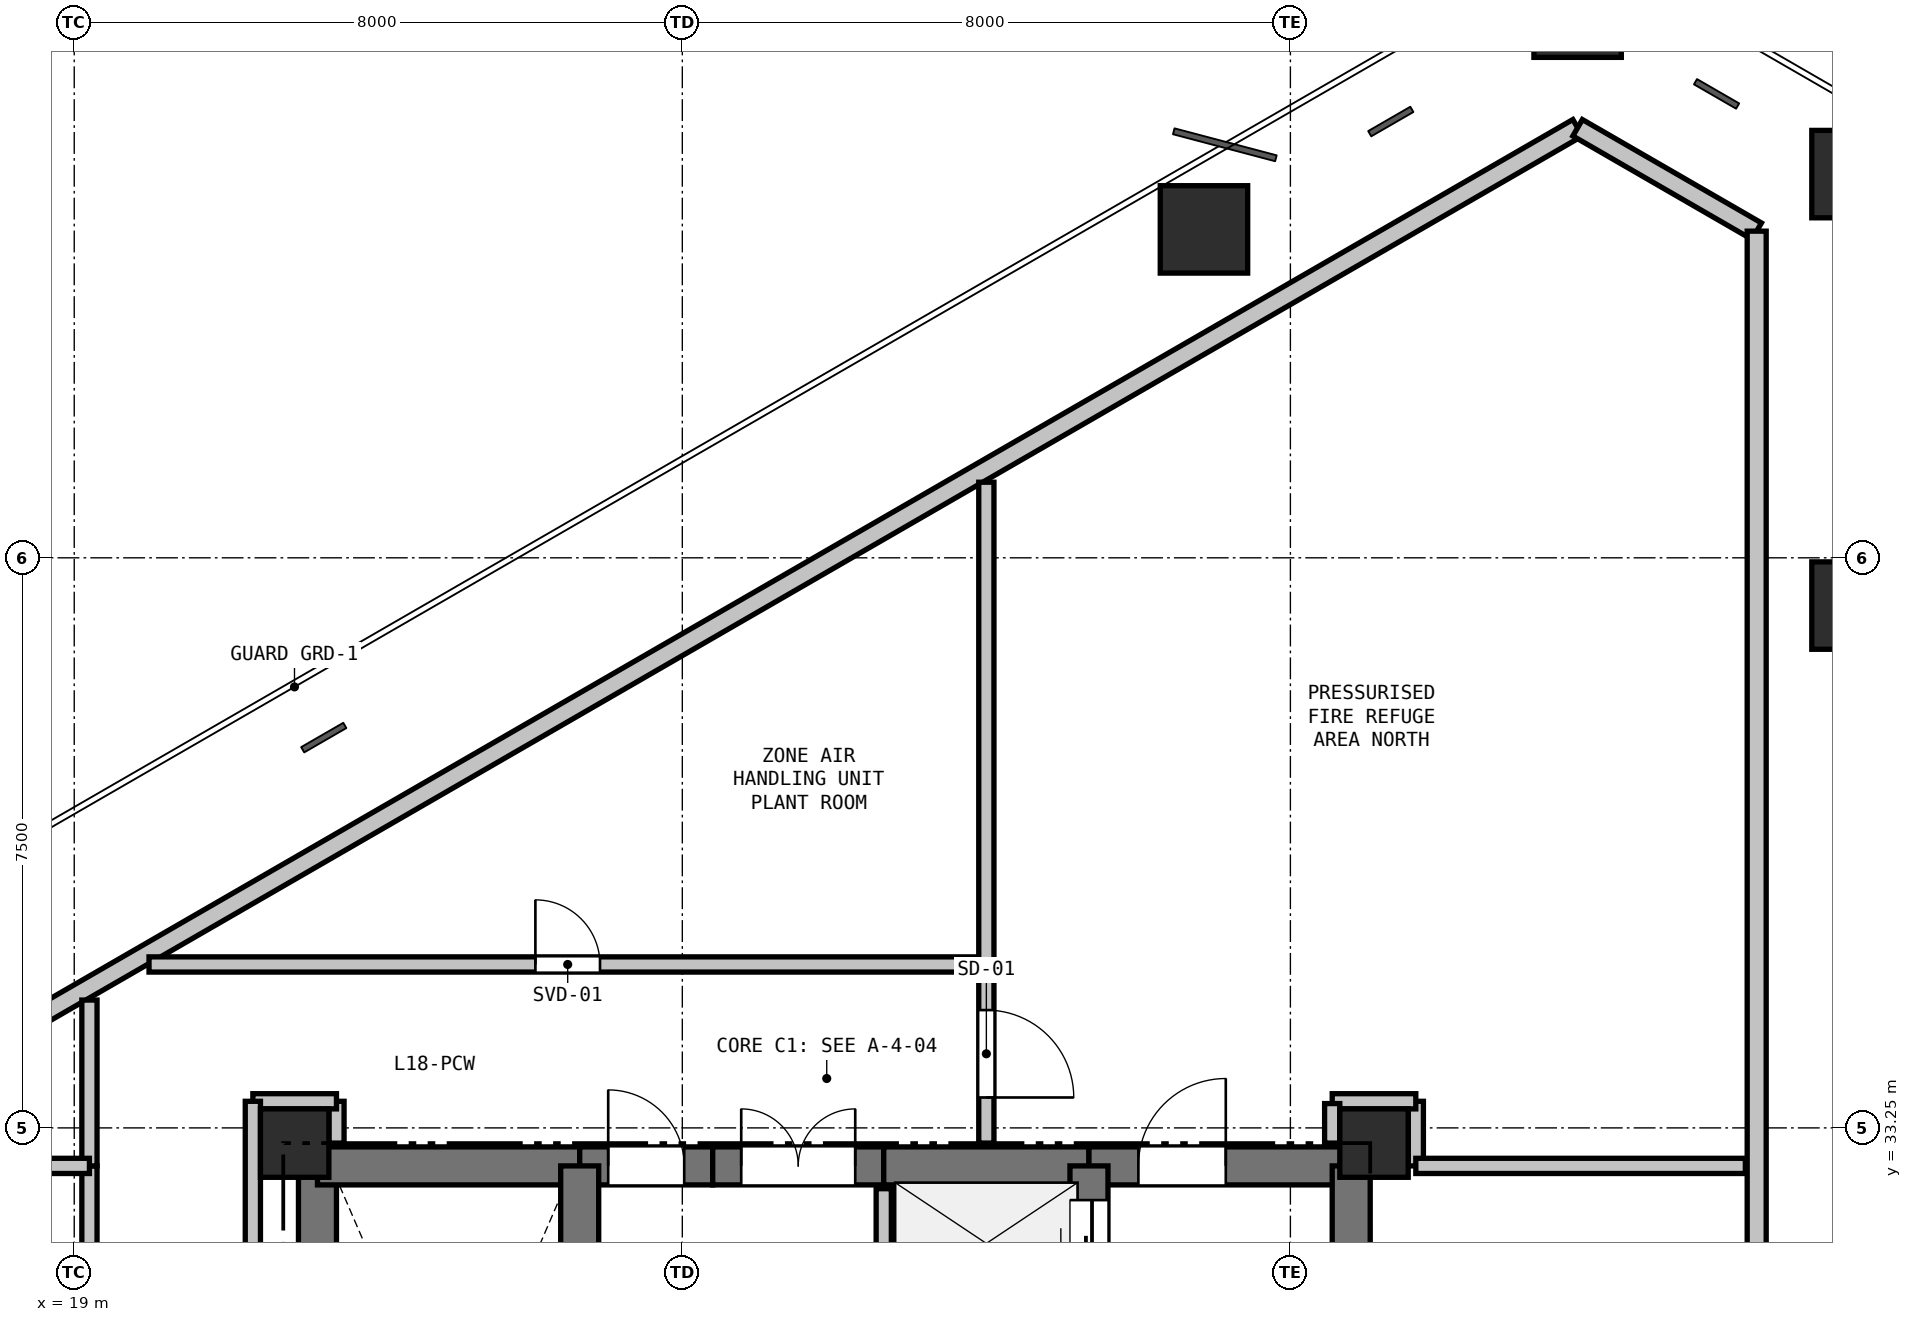
"""IFC4 building model, lengths in metres.
Left out: names, types, materials, properties, quantities, classifications, styles, units other than length and angle.
Written with IfcOpenShell. Run it as: python <this file> out.ifc"""

import sys

from ifc_helpers import new_model, si_unit, direction, frame, frame_2d, origin, origin_2d, place, context, subcontext, project, spatial, rectangle, hollow_rectangle, extrude, element, fill, save


model = new_model("IFC4")
c1 = context("Model", 3, precision=1e-05, world=origin(), true_north=direction((0.0, 1.0)))
c2 = subcontext(c1, "Body", "Model", "MODEL_VIEW")
j1 = project(units=[si_unit("LENGTHUNIT", "METRE"), si_unit("PLANEANGLEUNIT", "RADIAN")], contexts=[c1])
p1 = place(None, origin())
s1 = spatial("IfcSite", under=j1, at=p1, CompositionType="ELEMENT")
p2 = place(p1, origin())
s2 = spatial("IfcBuilding", under=s1, at=p2, CompositionType="ELEMENT")
p3 = place(p2, frame((0.0, 0.0, 66.9)))
s3 = spatial("IfcBuildingStorey", under=s2, at=p3, CompositionType="ELEMENT", Elevation=66.9)
for number, where, z_axis, x_axis in (
    (1, (21.9, 33.05, 0.0), (0.0, 0.0, 1.0), (1.0, 0.0, 0.0)),
    (2, (36.1, 33.05, 0.0), (0.0, 0.0, 1.0), (1.0, 0.0, 0.0)),
):
    element("IfcColumn", number, at=place(p3, frame(where, z_axis=z_axis, x_axis=x_axis)), inside=s3, PredefinedType="COLUMN", context=c2, shape_type="SweptSolid", body=[
        extrude(rectangle(XDim=0.9, YDim=0.9, at=origin_2d()), origin(), (0.0, 0.0, 1.0), 6.6),
    ])
for number, where, z_axis, x_axis in (
    (3, (33.863, 45.071, -0.32), (0.0, 0.0, 1.0), (1.0, 0.0, 0.0)),
    (4, (38.779, 47.909, -0.32), (0.0, 0.0, 1.0), (1.0, 0.0, 0.0)),
    (5, (42.435, 45.798, -0.32), (0.0, 0.0, 1.0), (1.0, 0.0, 0.0)),
    (6, (42.435, 40.122, -0.32), (0.0, 0.0, 1.0), (1.0, 0.0, 0.0)),
):
    element("IfcColumn", number, at=place(p3, frame(where, z_axis=z_axis, x_axis=x_axis)), inside=s3, PredefinedType="COLUMN", context=c2, shape_type="SweptSolid", body=[
        extrude(hollow_rectangle(XDim=1.15, YDim=1.15, WallThickness=0.032, at=origin_2d()), origin(), (0.0, 0.0, 1.0), 6.92),
    ])
p4 = place(p3, frame((7.087, 28.11, 0.0), z_axis=(0.0, 0.0, 1.0), x_axis=(0.866023716119, 0.500002923111, 0.0)))
e7 = element("IfcWall", 7, at=p4, inside=s3, PredefinedType="SOLIDWALL", context=c2, shape_type="SweptSolid", body=[
    extrude(rectangle(XDim=36.595, YDim=0.25, at=frame_2d((18.297, 0.0))), origin(), (0.0, 0.0, 1.0), 5.723),
])
p5 = place(p3, frame((38.779, 46.408, 0.0), z_axis=(0.0, 0.0, 1.0), x_axis=(0.865980815662, -0.500077220942, 0.0)))
e8 = element("IfcWall", 8, at=p5, inside=s3, PredefinedType="SOLIDWALL", context=c2, shape_type="SweptSolid", body=[
    extrude(rectangle(XDim=2.72, YDim=0.25, at=frame_2d((1.36, 0.0))), origin(), (0.0, 0.0, 1.0), 6.35),
])
p6 = place(p3, frame((41.135, 45.047, 0.0), z_axis=(0.0, 0.0, 1.0), x_axis=(0.0, -1.0, 0.0)))
e9 = element("IfcWall", 9, at=p6, inside=s3, PredefinedType="SOLIDWALL", context=c2, shape_type="SweptSolid", body=[
    extrude(rectangle(XDim=36.595, YDim=0.25, at=frame_2d((18.297, 0.0))), origin(), (0.0, 0.0, 1.0), 5.723),
])
p7 = place(p3, frame((22.2, 25.4, 0.0), z_axis=(0.0, 0.0, 1.0), x_axis=(0.0, 1.0, 0.0)))
e10 = element("IfcWall", 10, at=p7, inside=s3, PredefinedType="SHEAR", context=c2, shape_type="SweptSolid", body=[
    extrude(rectangle(XDim=7.35, YDim=0.5, at=frame_2d((3.675, 0.0))), origin(), (0.0, 0.0, 1.0), 6.35),
])
p8 = place(p3, frame((22.2, 32.75, 0.0), z_axis=(0.0, 0.0, 1.0), x_axis=(1.0, 0.0, 0.0)))
e11 = element("IfcWall", 11, at=p8, inside=s3, PredefinedType="SHEAR", context=c2, shape_type="SweptSolid", body=[
    extrude(rectangle(XDim=3.45, YDim=0.5, at=frame_2d((1.725, 0.0))), origin(), (0.0, 0.0, 1.0), 6.35),
])
p9 = place(p3, frame((25.65, 32.75, 0.0), z_axis=(0.0, 0.0, 1.0), x_axis=(1.0, 0.0, 0.0)))
e12 = element("IfcWall", 12, at=p9, inside=s3, PredefinedType="SHEAR", context=c2, shape_type="SweptSolid", body=[
    extrude(rectangle(XDim=1.75, YDim=0.5, at=frame_2d((0.875, 0.0))), origin(), (0.0, 0.0, 1.0), 6.35),
])
p10 = place(p9, frame((0.375, 0.0, 0.0)))
e13 = element("IfcOpeningElement", 13, at=p10, cuts=e12, PredefinedType="OPENING", context=c2, shape_type="SweptSolid", body=[
    extrude(rectangle(XDim=1.0, YDim=2.15, at=frame_2d((0.5, 1.075))), frame((0.0, 0.26, 0.0), z_axis=(0.0, -1.0, 0.0), x_axis=(1.0, 0.0, 0.0)), (0.0, 0.0, 1.0), 0.52),
])
p11 = place(p3, frame((27.4, 32.75, 0.0), z_axis=(0.0, 0.0, 1.0), x_axis=(1.0, 0.0, 0.0)))
e14 = element("IfcWall", 14, at=p11, inside=s3, PredefinedType="SHEAR", context=c2, shape_type="SweptSolid", body=[
    extrude(rectangle(XDim=2.25, YDim=0.5, at=frame_2d((1.125, 0.0))), origin(), (0.0, 0.0, 1.0), 6.35),
])
p12 = place(p11, frame((0.375, 0.0, 0.0)))
e15 = element("IfcOpeningElement", 15, at=p12, cuts=e14, PredefinedType="OPENING", context=c2, shape_type="SweptSolid", body=[
    extrude(rectangle(XDim=1.5, YDim=2.2, at=frame_2d((0.75, 1.1))), frame((0.0, 0.26, 0.0), z_axis=(0.0, -1.0, 0.0), x_axis=(1.0, 0.0, 0.0)), (0.0, 0.0, 1.0), 0.52),
])
p13 = place(p3, frame((29.65, 32.75, 0.0), z_axis=(0.0, 0.0, 1.0), x_axis=(1.0, 0.0, 0.0)))
e16 = element("IfcWall", 16, at=p13, inside=s3, PredefinedType="SHEAR", context=c2, shape_type="SweptSolid", body=[
    extrude(rectangle(XDim=2.7, YDim=0.5, at=frame_2d((1.35, 0.0))), origin(), (0.0, 0.0, 1.0), 6.35),
])
p14 = place(p3, frame((32.35, 32.75, 0.0), z_axis=(0.0, 0.0, 1.0), x_axis=(1.0, 0.0, 0.0)))
e17 = element("IfcWall", 17, at=p14, inside=s3, PredefinedType="SHEAR", context=c2, shape_type="SweptSolid", body=[
    extrude(rectangle(XDim=3.45, YDim=0.5, at=frame_2d((1.725, 0.0))), origin(), (0.0, 0.0, 1.0), 6.35),
])
p15 = place(p14, frame((0.65, 0.0, 0.0)))
e18 = element("IfcOpeningElement", 18, at=p15, cuts=e17, PredefinedType="OPENING", context=c2, shape_type="SweptSolid", body=[
    extrude(rectangle(XDim=1.15, YDim=2.15, at=frame_2d((0.575, 1.075))), frame((0.0, 0.26, 0.0), z_axis=(0.0, -1.0, 0.0), x_axis=(1.0, 0.0, 0.0)), (0.0, 0.0, 1.0), 0.52),
])
p16 = place(p3, frame((35.8, 32.75, 0.0), z_axis=(0.0, 0.0, 1.0), x_axis=(0.0, -1.0, 0.0)))
e19 = element("IfcWall", 19, at=p16, inside=s3, PredefinedType="SHEAR", context=c2, shape_type="SweptSolid", body=[
    extrude(rectangle(XDim=4.65, YDim=0.5, at=frame_2d((2.325, 0.0))), origin(), (0.0, 0.0, 1.0), 6.35),
])
p17 = place(p3, frame((25.65, 27.95, 0.0), z_axis=(0.0, 0.0, 1.0), x_axis=(0.0, 1.0, 0.0)))
e20 = element("IfcWall", 20, at=p17, inside=s3, PredefinedType="SHEAR", context=c2, shape_type="SweptSolid", body=[
    extrude(rectangle(XDim=4.8, YDim=0.5, at=frame_2d((2.4, 0.0))), origin(), (0.0, 0.0, 1.0), 6.35),
])
p18 = place(p3, frame((32.35, 30.75, 0.0), z_axis=(0.0, 0.0, 1.0), x_axis=(0.0, 1.0, 0.0)))
e21 = element("IfcWall", 21, at=p18, inside=s3, PredefinedType="SHEAR", context=c2, shape_type="SweptSolid", body=[
    extrude(rectangle(XDim=2.0, YDim=0.5, at=frame_2d((1.0, 0.0))), origin(), (0.0, 0.0, 1.0), 6.35),
])
p19 = place(p18, frame((0.45, 0.0, 0.0)))
e22 = element("IfcOpeningElement", 22, at=p19, cuts=e21, PredefinedType="OPENING", context=c2, shape_type="SweptSolid", body=[
    extrude(rectangle(XDim=1.1, YDim=2.15, at=frame_2d((0.55, 1.075))), frame((0.0, 0.26, 0.0), z_axis=(0.0, -1.0, 0.0), x_axis=(1.0, 0.0, 0.0)), (0.0, 0.0, 1.0), 0.52),
])
p20 = place(p3, frame((29.65, 30.3, 0.0), z_axis=(0.0, 0.0, 1.0), x_axis=(0.0, 1.0, 0.0)))
e23 = element("IfcWall", 23, at=p20, inside=s3, PredefinedType="PARTITIONING", context=c2, shape_type="SweptSolid", body=[
    extrude(rectangle(XDim=2.15, YDim=0.2, at=frame_2d((1.075, 0.0))), origin(), (0.0, 0.0, 1.0), 6.35),
])
p21 = place(p3, frame((19.984, 35.4, 0.0), z_axis=(0.0, 0.0, 1.0), x_axis=(1.0, 0.0, 0.0)))
e24 = element("IfcWall", 24, at=p21, inside=s3, PredefinedType="PARTITIONING", context=c2, shape_type="SweptSolid", body=[
    extrude(rectangle(XDim=11.016, YDim=0.2, at=frame_2d((5.508, 0.0))), origin(), (0.0, 0.0, 1.0), 6.35),
])
p22 = place(p21, frame((5.083, 0.0, 0.0)))
e25 = element("IfcOpeningElement", 25, at=p22, cuts=e24, PredefinedType="OPENING", context=c2, shape_type="SweptSolid", body=[
    extrude(rectangle(XDim=0.85, YDim=2.1, at=frame_2d((0.425, 1.05))), frame((0.0, 0.11, 0.0), z_axis=(0.0, -1.0, 0.0), x_axis=(1.0, 0.0, 0.0)), (0.0, 0.0, 1.0), 0.22),
])
p23 = place(p3, frame((31.0, 35.4, 0.0), z_axis=(0.0, 0.0, 1.0), x_axis=(0.0, -1.0, 0.0)))
e26 = element("IfcWall", 26, at=p23, inside=s3, PredefinedType="PARTITIONING", context=c2, shape_type="SweptSolid", body=[
    extrude(rectangle(XDim=2.35, YDim=0.2, at=frame_2d((1.175, 0.0))), origin(), (0.0, 0.0, 1.0), 5.798),
])
p24 = place(p23, frame((0.6, 0.0, 0.0)))
e27 = element("IfcOpeningElement", 27, at=p24, cuts=e26, PredefinedType="OPENING", context=c2, shape_type="SweptSolid", body=[
    extrude(rectangle(XDim=1.15, YDim=2.15, at=frame_2d((0.575, 1.075))), frame((0.0, 0.11, 0.0), z_axis=(0.0, -1.0, 0.0), x_axis=(1.0, 0.0, 0.0)), (0.0, 0.0, 1.0), 0.22),
])
p25 = place(p3, frame((22.45, 33.05, 0.0), z_axis=(0.0, 0.0, 1.0), x_axis=(0.0, 1.0, 0.0)))
e28 = element("IfcWall", 28, at=p25, inside=s3, PredefinedType="PARTITIONING", context=c2, shape_type="SweptSolid", body=[
    extrude(rectangle(XDim=0.55, YDim=0.2, at=frame_2d((0.275, 0.0))), origin(), (0.0, 0.0, 1.0), 5.798),
])
p26 = place(p3, frame((22.45, 33.6, 0.0), z_axis=(0.0, 0.0, 1.0), x_axis=(-1.0, 0.0, 0.0)))
e29 = element("IfcWall", 29, at=p26, inside=s3, PredefinedType="PARTITIONING", context=c2, shape_type="SweptSolid", body=[
    extrude(rectangle(XDim=1.1, YDim=0.2, at=frame_2d((0.55, 0.0))), origin(), (0.0, 0.0, 1.0), 6.35),
])
p27 = place(p3, frame((21.35, 33.6, 0.0), z_axis=(0.0, 0.0, 1.0), x_axis=(0.0, -1.0, 0.0)))
e30 = element("IfcWall", 30, at=p27, inside=s3, PredefinedType="PARTITIONING", context=c2, shape_type="SweptSolid", body=[
    extrude(rectangle(XDim=13.7, YDim=0.2, at=frame_2d((6.85, 0.0))), origin(), (0.0, 0.0, 1.0), 5.723),
])
p28 = place(p3, frame((19.2, 20.75, 0.0), z_axis=(0.0, 0.0, 1.0), x_axis=(0.0, 1.0, 0.0)))
e31 = element("IfcWall", 31, at=p28, inside=s3, PredefinedType="PARTITIONING", context=c2, shape_type="SweptSolid", body=[
    extrude(rectangle(XDim=12.0, YDim=0.2, at=frame_2d((6.0, 0.0))), origin(), (0.0, 0.0, 1.0), 5.723),
])
p29 = place(p28, frame((5.575, 0.0, 0.0)))
e32 = element("IfcOpeningElement", 32, at=p29, cuts=e31, PredefinedType="OPENING", context=c2, shape_type="SweptSolid", body=[
    extrude(rectangle(XDim=0.85, YDim=2.1, at=frame_2d((0.425, 1.05))), frame((0.0, 0.11, 0.0), z_axis=(0.0, -1.0, 0.0), x_axis=(1.0, 0.0, 0.0)), (0.0, 0.0, 1.0), 0.22),
])
p30 = place(p3, frame((19.2, 32.75, 0.0), z_axis=(0.0, 0.0, 1.0), x_axis=(0.0, 1.0, 0.0)))
e33 = element("IfcWall", 33, at=p30, inside=s3, PredefinedType="PARTITIONING", context=c2, shape_type="SweptSolid", body=[
    extrude(rectangle(XDim=2.182, YDim=0.2, at=frame_2d((1.091, 0.0))), origin(), (0.0, 0.0, 1.0), 5.723),
])
p31 = place(p3, frame((36.65, 32.75, 0.0), z_axis=(0.0, 0.0, 1.0), x_axis=(0.0, 1.0, 0.0)))
e34 = element("IfcWall", 34, at=p31, inside=s3, PredefinedType="PARTITIONING", context=c2, shape_type="SweptSolid", body=[
    extrude(rectangle(XDim=0.85, YDim=0.2, at=frame_2d((0.425, 0.0))), origin(), (0.0, 0.0, 1.0), 5.723),
])
p32 = place(p3, frame((36.65, 33.6, 0.0), z_axis=(0.0, 0.0, 1.0), x_axis=(-1.0, 0.0, 0.0)))
e35 = element("IfcWall", 35, at=p32, inside=s3, PredefinedType="PARTITIONING", context=c2, shape_type="SweptSolid", body=[
    extrude(rectangle(XDim=1.1, YDim=0.2, at=frame_2d((0.55, 0.0))), origin(), (0.0, 0.0, 1.0), 5.723),
])
p33 = place(p3, frame((35.55, 33.57, 0.0), z_axis=(0.0, 0.0, 1.0), x_axis=(0.0, -1.0, 0.0)))
e36 = element("IfcWall", 36, at=p33, inside=s3, PredefinedType="PARTITIONING", context=c2, shape_type="SweptSolid", body=[
    extrude(rectangle(XDim=0.52, YDim=0.2, at=frame_2d((0.26, 0.0))), origin(), (0.0, 0.0, 1.0), 5.798),
])
p34 = place(p3, frame((31.0, 35.4, 0.0), z_axis=(0.0, 0.0, 1.0), x_axis=(0.0, 1.0, 0.0)))
e37 = element("IfcWall", 37, at=p34, inside=s3, PredefinedType="PARTITIONING", context=c2, shape_type="SweptSolid", body=[
    extrude(rectangle(XDim=6.344, YDim=0.2, at=frame_2d((3.172, 0.0))), origin(), (0.0, 0.0, 1.0), 6.35),
])
p35 = place(p3, frame((40.986, 32.75, 0.0), z_axis=(0.0, 0.0, 1.0), x_axis=(-1.0, 0.0, 0.0)))
e38 = element("IfcWall", 38, at=p35, inside=s3, PredefinedType="PARTITIONING", context=c2, shape_type="SweptSolid", body=[
    extrude(rectangle(XDim=4.336, YDim=0.2, at=frame_2d((2.168, 0.0))), origin(), (0.0, 0.0, 1.0), 6.35),
])
p36 = place(p3, frame((15.394, 32.75, 0.0), z_axis=(0.0, 0.0, 1.0), x_axis=(1.0, 0.0, 0.0)))
e39 = element("IfcWall", 39, at=p36, inside=s3, PredefinedType="PARTITIONING", context=c2, shape_type="SweptSolid", body=[
    extrude(rectangle(XDim=3.806, YDim=0.2, at=frame_2d((1.903, 0.0))), origin(), (0.0, 0.0, 1.0), 5.723),
])
p37 = place(p10, origin())
e40 = element("IfcDoor", 40, at=p37, inside=s3, OperationType="SINGLE_SWING_LEFT", PredefinedType="DOOR", context=c2, shape_type="SweptSolid", body=[
    extrude(rectangle(XDim=1.0, YDim=2.15, at=frame_2d((0.5, 1.075))), frame((0.0, 0.025, 0.0), z_axis=(0.0, -1.0, 0.0), x_axis=(1.0, 0.0, 0.0)), (0.0, 0.0, 1.0), 0.05),
])
fill(e13, e40)
p38 = place(p19, origin())
e41 = element("IfcDoor", 41, at=p38, inside=s3, OperationType="SLIDING_TO_LEFT", PredefinedType="DOOR", context=c2, shape_type="SweptSolid", body=[
    extrude(rectangle(XDim=1.1, YDim=2.15, at=frame_2d((0.55, 1.075))), frame((0.0, 0.025, 0.0), z_axis=(0.0, -1.0, 0.0), x_axis=(1.0, 0.0, 0.0)), (0.0, 0.0, 1.0), 0.05),
])
fill(e22, e41)
p39 = place(p15, origin())
e42 = element("IfcDoor", 42, at=p39, inside=s3, OperationType="SINGLE_SWING_RIGHT", PredefinedType="DOOR", context=c2, shape_type="SweptSolid", body=[
    extrude(rectangle(XDim=1.15, YDim=2.15, at=frame_2d((0.575, 1.075))), frame((0.0, 0.025, 0.0), z_axis=(0.0, -1.0, 0.0), x_axis=(1.0, 0.0, 0.0)), (0.0, 0.0, 1.0), 0.05),
])
fill(e18, e42)
p40 = place(p12, origin())
e43 = element("IfcDoor", 43, at=p40, inside=s3, OperationType="DOUBLE_DOOR_SINGLE_SWING", PredefinedType="DOOR", context=c2, shape_type="SweptSolid", body=[
    extrude(rectangle(XDim=1.5, YDim=2.2, at=frame_2d((0.75, 1.1))), frame((0.0, 0.025, 0.0), z_axis=(0.0, -1.0, 0.0), x_axis=(1.0, 0.0, 0.0)), (0.0, 0.0, 1.0), 0.05),
])
fill(e15, e43)
p41 = place(p24, origin())
e44 = element("IfcDoor", 44, at=p41, inside=s3, OperationType="SINGLE_SWING_RIGHT", PredefinedType="DOOR", context=c2, shape_type="SweptSolid", body=[
    extrude(rectangle(XDim=1.15, YDim=2.15, at=frame_2d((0.575, 1.075))), frame((0.0, 0.025, 0.0), z_axis=(0.0, -1.0, 0.0), x_axis=(1.0, 0.0, 0.0)), (0.0, 0.0, 1.0), 0.05),
])
fill(e27, e44)
p42 = place(p22, origin())
e45 = element("IfcDoor", 45, at=p42, inside=s3, OperationType="SINGLE_SWING_LEFT", PredefinedType="DOOR", context=c2, shape_type="SweptSolid", body=[
    extrude(rectangle(XDim=0.85, YDim=2.1, at=frame_2d((0.425, 1.05))), frame((0.0, 0.025, 0.0), z_axis=(0.0, -1.0, 0.0), x_axis=(1.0, 0.0, 0.0)), (0.0, 0.0, 1.0), 0.05),
])
fill(e25, e45)
save(model, sys.argv[1])
